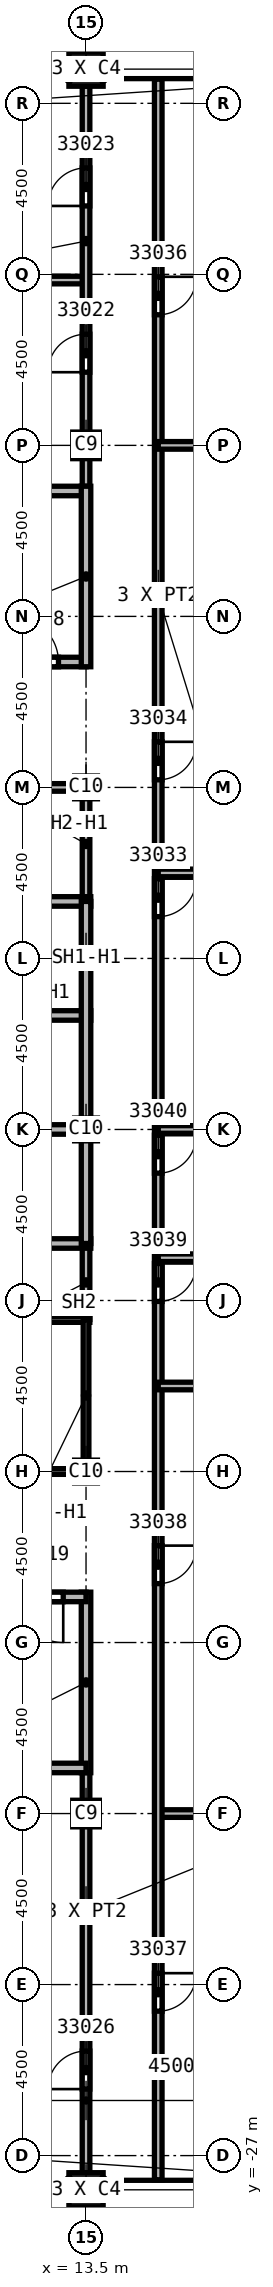
"""IFC4 building model, lengths in metres.
Left out: names, types, materials, properties, quantities, classifications, styles, units other than length and angle.
Written with IfcOpenShell. Run it as: python <this file> out.ifc"""

import sys

from ifc_helpers import new_model, si_unit, direction, frame, frame_2d, origin, origin_2d, place, context, subcontext, project, spatial, rectangle, extrude, element, fill, save


model = new_model("IFC4")
c1 = context("Model", 3, precision=1e-05, world=origin(), true_north=direction((0.0, 1.0)))
c2 = subcontext(c1, "Body", "Model", "MODEL_VIEW")
j1 = project(units=[si_unit("LENGTHUNIT", "METRE"), si_unit("PLANEANGLEUNIT", "RADIAN")], contexts=[c1])
p1 = place(None, origin())
s1 = spatial("IfcSite", under=j1, at=p1, CompositionType="ELEMENT")
p2 = place(p1, origin())
s2 = spatial("IfcBuilding", under=s1, at=p2, CompositionType="ELEMENT")
p3 = place(p2, frame((0.0, 0.0, 361.0)))
s3 = spatial("IfcBuildingStorey", under=s2, at=p3, CompositionType="ELEMENT", Elevation=361.0)
for number, where, z_axis, x_axis in (
    (1, (13.5, 18.0, 0.0), (0.0, 0.0, 1.0), (1.0, 0.0, 0.0)),
    (2, (13.5, -18.0, 0.0), (0.0, 0.0, 1.0), (1.0, 0.0, 0.0)),
):
    element("IfcColumn", number, at=place(p3, frame(where, z_axis=z_axis, x_axis=x_axis)), inside=s3, PredefinedType="COLUMN", context=c2, shape_type="SweptSolid", body=[
        extrude(rectangle(XDim=0.7, YDim=0.7, at=origin_2d()), origin(), (0.0, 0.0, 1.0), 4.6),
    ])
for number, where, z_axis, x_axis in (
    (3, (13.5, 0.0, 0.0), (0.0, 0.0, 1.0), (1.0, 0.0, 0.0)),
    (4, (13.5, 9.0, 0.0), (0.0, 0.0, 1.0), (1.0, 0.0, 0.0)),
    (5, (13.5, -9.0, 0.0), (0.0, 0.0, 1.0), (1.0, 0.0, 0.0)),
):
    element("IfcColumn", number, at=place(p3, frame(where, z_axis=z_axis, x_axis=x_axis)), inside=s3, PredefinedType="COLUMN", context=c2, shape_type="SweptSolid", body=[
        extrude(rectangle(XDim=0.6, YDim=0.6, at=origin_2d()), origin(), (0.0, 0.0, 1.0), 4.6),
    ])
for number, where, z_axis, x_axis in (
    (6, (13.5, 27.9, 0.0), (0.0, 0.0, 1.0), (1.0, 0.0, 0.0)),
    (7, (13.5, -27.9, 0.0), (0.0, 0.0, 1.0), (1.0, 0.0, 0.0)),
):
    element("IfcColumn", number, at=place(p3, frame(where, z_axis=z_axis, x_axis=x_axis)), inside=s3, PredefinedType="COLUMN", context=c2, shape_type="SweptSolid", body=[
        extrude(rectangle(XDim=0.9, YDim=0.9, at=origin_2d()), origin(), (0.0, 0.0, 1.0), 4.6),
    ])
p4 = place(p3, frame((3.0, 22.35, 0.0), z_axis=(0.0, 0.0, 1.0), x_axis=(1.0, 0.0, 0.0)))
e8 = element("IfcWall", 8, at=p4, inside=s3, PredefinedType="PARTITIONING", context=c2, shape_type="SweptSolid", body=[
    extrude(rectangle(XDim=10.5, YDim=0.2, at=frame_2d((5.25, 0.0))), origin(), (0.0, 0.0, 1.0), 4.15),
])
p5 = place(p3, frame((13.5, -27.45, 0.0), z_axis=(0.0, 0.0, 1.0), x_axis=(0.0, 1.0, 0.0)))
e9 = element("IfcWall", 9, at=p5, inside=s3, PredefinedType="PARTITIONING", context=c2, shape_type="SweptSolid", body=[
    extrude(rectangle(XDim=10.775, YDim=0.2, at=frame_2d((5.387, 0.0))), origin(), (0.0, 0.0, 1.0), 4.15),
])
p6 = place(p5, frame((2.2, 0.0, 0.0)))
e10 = element("IfcOpeningElement", 10, at=p6, cuts=e9, PredefinedType="OPENING", context=c2, shape_type="SweptSolid", body=[
    extrude(rectangle(XDim=1.0, YDim=2.1, at=frame_2d((0.5, 1.05))), frame((0.0, 0.1, 0.0), z_axis=(0.0, -1.0, 0.0), x_axis=(1.0, 0.0, 0.0)), (0.0, 0.0, 1.0), 0.2),
])
p7 = place(p3, frame((13.5, 16.675, 0.0), z_axis=(0.0, 0.0, 1.0), x_axis=(0.0, 1.0, 0.0)))
e11 = element("IfcWall", 11, at=p7, inside=s3, PredefinedType="PARTITIONING", context=c2, shape_type="SweptSolid", body=[
    extrude(rectangle(XDim=10.775, YDim=0.2, at=frame_2d((5.387, 0.0))), origin(), (0.0, 0.0, 1.0), 4.15),
])
p8 = place(p7, frame((3.25, 0.0, 0.0)))
e12 = element("IfcOpeningElement", 12, at=p8, cuts=e11, PredefinedType="OPENING", context=c2, shape_type="SweptSolid", body=[
    extrude(rectangle(XDim=1.0, YDim=2.1, at=frame_2d((0.5, 1.05))), frame((0.0, 0.1, 0.0), z_axis=(0.0, -1.0, 0.0), x_axis=(1.0, 0.0, 0.0)), (0.0, 0.0, 1.0), 0.2),
])
p9 = place(p7, frame((7.625, 0.0, 0.0)))
e13 = element("IfcOpeningElement", 13, at=p9, cuts=e11, PredefinedType="OPENING", context=c2, shape_type="SweptSolid", body=[
    extrude(rectangle(XDim=1.0, YDim=2.1, at=frame_2d((0.5, 1.05))), frame((0.0, 0.1, 0.0), z_axis=(0.0, -1.0, 0.0), x_axis=(1.0, 0.0, 0.0)), (0.0, 0.0, 1.0), 0.2),
])
p10 = place(p3, frame((15.4, -18.0, 0.0), z_axis=(0.0, 0.0, 1.0), x_axis=(1.0, 0.0, 0.0)))
e14 = element("IfcWall", 14, at=p10, inside=s3, PredefinedType="PARTITIONING", context=c2, shape_type="SweptSolid", body=[
    extrude(rectangle(XDim=8.9, YDim=0.2, at=frame_2d((4.45, 0.0))), origin(), (0.0, 0.0, 1.0), 4.15),
])
p11 = place(p3, frame((15.4, 27.636, 0.0), z_axis=(0.0, 0.0, 1.0), x_axis=(0.0, -1.0, 0.0)))
e15 = element("IfcWall", 15, at=p11, inside=s3, PredefinedType="PARTITIONING", context=c2, shape_type="SweptSolid", body=[
    extrude(rectangle(XDim=55.272, YDim=0.2, at=frame_2d((27.636, 0.0))), origin(), (0.0, 0.0, 1.0), 4.15),
])
p12 = place(p11, frame((21.036, 0.0, 0.0)))
e16 = element("IfcOpeningElement", 16, at=p12, cuts=e15, PredefinedType="OPENING", context=c2, shape_type="SweptSolid", body=[
    extrude(rectangle(XDim=1.0, YDim=2.1, at=frame_2d((0.5, 1.05))), frame((0.0, 0.1, 0.0), z_axis=(0.0, -1.0, 0.0), x_axis=(1.0, 0.0, 0.0)), (0.0, 0.0, 1.0), 0.2),
])
p13 = place(p11, frame((17.436, 0.0, 0.0)))
e17 = element("IfcOpeningElement", 17, at=p13, cuts=e15, PredefinedType="OPENING", context=c2, shape_type="SweptSolid", body=[
    extrude(rectangle(XDim=1.0, YDim=2.1, at=frame_2d((0.5, 1.05))), frame((0.0, 0.1, 0.0), z_axis=(0.0, -1.0, 0.0), x_axis=(1.0, 0.0, 0.0)), (0.0, 0.0, 1.0), 0.2),
])
p14 = place(p11, frame((5.2, 0.0, 0.0)))
e18 = element("IfcOpeningElement", 18, at=p14, cuts=e15, PredefinedType="OPENING", context=c2, shape_type="SweptSolid", body=[
    extrude(rectangle(XDim=1.0, YDim=2.1, at=frame_2d((0.5, 1.05))), frame((0.0, 0.1, 0.0), z_axis=(0.0, -1.0, 0.0), x_axis=(1.0, 0.0, 0.0)), (0.0, 0.0, 1.0), 0.2),
])
p15 = place(p11, frame((49.836, 0.0, 0.0)))
e19 = element("IfcOpeningElement", 19, at=p15, cuts=e15, PredefinedType="OPENING", context=c2, shape_type="SweptSolid", body=[
    extrude(rectangle(XDim=1.0, YDim=2.1, at=frame_2d((0.5, 1.05))), frame((0.0, 0.1, 0.0), z_axis=(0.0, -1.0, 0.0), x_axis=(1.0, 0.0, 0.0)), (0.0, 0.0, 1.0), 0.2),
])
p16 = place(p11, frame((38.586, 0.0, 0.0)))
e20 = element("IfcOpeningElement", 20, at=p16, cuts=e15, PredefinedType="OPENING", context=c2, shape_type="SweptSolid", body=[
    extrude(rectangle(XDim=1.0, YDim=2.1, at=frame_2d((0.5, 1.05))), frame((0.0, 0.1, 0.0), z_axis=(0.0, -1.0, 0.0), x_axis=(1.0, 0.0, 0.0)), (0.0, 0.0, 1.0), 0.2),
])
p17 = place(p11, frame((31.161, 0.0, 0.0)))
e21 = element("IfcOpeningElement", 21, at=p17, cuts=e15, PredefinedType="OPENING", context=c2, shape_type="SweptSolid", body=[
    extrude(rectangle(XDim=1.0, YDim=2.1, at=frame_2d((0.5, 1.05))), frame((0.0, 0.1, 0.0), z_axis=(0.0, -1.0, 0.0), x_axis=(1.0, 0.0, 0.0)), (0.0, 0.0, 1.0), 0.2),
])
p18 = place(p11, frame((27.786, 0.0, 0.0)))
e22 = element("IfcOpeningElement", 22, at=p18, cuts=e15, PredefinedType="OPENING", context=c2, shape_type="SweptSolid", body=[
    extrude(rectangle(XDim=1.0, YDim=2.1, at=frame_2d((0.5, 1.05))), frame((0.0, 0.1, 0.0), z_axis=(0.0, -1.0, 0.0), x_axis=(1.0, 0.0, 0.0)), (0.0, 0.0, 1.0), 0.2),
])
for number, where, z_axis, x_axis in (
    (23, (15.4, -6.75, 0.0), (0.0, 0.0, 1.0), (1.0, 0.0, 0.0)),
    (24, (15.4, -3.375, 0.0), (0.0, 0.0, 1.0), (1.0, 0.0, 0.0)),
):
    element("IfcWall", number, at=place(p3, frame(where, z_axis=z_axis, x_axis=x_axis)), inside=s3, PredefinedType="PARTITIONING", context=c2, shape_type="SweptSolid", body=[
        extrude(rectangle(XDim=11.336, YDim=0.2, at=frame_2d((5.668, 0.0))), origin(), (0.0, 0.0, 1.0), 4.15),
    ])
p19 = place(p3, frame((15.4, 6.75, 0.0), z_axis=(0.0, 0.0, 1.0), x_axis=(1.0, 0.0, 0.0)))
e25 = element("IfcWall", 25, at=p19, inside=s3, PredefinedType="PARTITIONING", context=c2, shape_type="SweptSolid", body=[
    extrude(rectangle(XDim=4.6, YDim=0.2, at=frame_2d((2.3, 0.0))), origin(), (0.0, 0.0, 1.0), 4.15),
])
p20 = place(p3, frame((15.4, 18.0, 0.0), z_axis=(0.0, 0.0, 1.0), x_axis=(1.0, 0.0, 0.0)))
e26 = element("IfcWall", 26, at=p20, inside=s3, PredefinedType="PARTITIONING", context=c2, shape_type="SweptSolid", body=[
    extrude(rectangle(XDim=8.9, YDim=0.2, at=frame_2d((4.45, 0.0))), origin(), (0.0, 0.0, 1.0), 4.15),
])
p21 = place(p3, frame((26.55, 0.0, 0.0), z_axis=(0.0, 0.0, 1.0), x_axis=(-1.0, 0.0, 0.0)))
e27 = element("IfcWall", 27, at=p21, inside=s3, PredefinedType="PARTITIONING", context=c2, shape_type="SweptSolid", body=[
    extrude(rectangle(XDim=11.15, YDim=0.2, at=frame_2d((5.575, 0.0))), origin(), (0.0, 0.0, 1.0), 4.15),
])
p22 = place(p3, frame((10.5, 9.0, 0.0), z_axis=(0.0, 0.0, 1.0), x_axis=(1.0, 0.0, 0.0)))
e28 = element("IfcWall", 28, at=p22, inside=s3, PredefinedType="SOLIDWALL", context=c2, shape_type="SweptSolid", body=[
    extrude(rectangle(XDim=3.0, YDim=0.2, at=frame_2d((1.5, 0.0))), origin(), (0.0, 0.0, 1.0), 3.838),
])
p23 = place(p3, frame((13.5, -3.0, 0.0), z_axis=(0.0, 0.0, 1.0), x_axis=(0.0, -1.0, 0.0)))
e29 = element("IfcWall", 29, at=p23, inside=s3, PredefinedType="SOLIDWALL", context=c2, shape_type="SweptSolid", body=[
    extrude(rectangle(XDim=2.0, YDim=0.2, at=frame_2d((1.0, 0.0))), origin(), (0.0, 0.0, 1.0), 3.838),
])
p24 = place(p3, frame((13.5, 9.1, 0.0), z_axis=(0.0, 0.0, 1.0), x_axis=(0.0, -1.0, 0.0)))
e30 = element("IfcWall", 30, at=p24, inside=s3, PredefinedType="SOLIDWALL", context=c2, shape_type="SweptSolid", body=[
    extrude(rectangle(XDim=3.1, YDim=0.2, at=frame_2d((1.55, 0.0))), origin(), (0.0, 0.0, 1.0), 3.838),
])
p25 = place(p3, frame((7.5, -3.0, 0.0), z_axis=(0.0, 0.0, 1.0), x_axis=(1.0, 0.0, 0.0)))
e31 = element("IfcWall", 31, at=p25, inside=s3, PredefinedType="SOLIDWALL", context=c2, shape_type="SweptSolid", body=[
    extrude(rectangle(XDim=6.125, YDim=0.25, at=frame_2d((3.062, 0.0))), origin(), (0.0, 0.0, 1.0), 4.15),
])
p26 = place(p25, frame((0.25, 0.0, 0.0)))
e32 = element("IfcOpeningElement", 32, at=p26, cuts=e31, PredefinedType="OPENING", context=c2, shape_type="SweptSolid", body=[
    extrude(rectangle(XDim=1.1, YDim=2.1, at=frame_2d((0.55, 1.05))), frame((0.0, 0.125, 0.0), z_axis=(0.0, -1.0, 0.0), x_axis=(1.0, 0.0, 0.0)), (0.0, 0.0, 1.0), 0.25),
])
p27 = place(p3, frame((7.5, 3.0, 0.0), z_axis=(0.0, 0.0, 1.0), x_axis=(1.0, 0.0, 0.0)))
e33 = element("IfcWall", 33, at=p27, inside=s3, PredefinedType="SOLIDWALL", context=c2, shape_type="SweptSolid", body=[
    extrude(rectangle(XDim=6.125, YDim=0.25, at=frame_2d((3.062, 0.0))), origin(), (0.0, 0.0, 1.0), 4.15),
])
p28 = place(p27, frame((0.25, 0.0, 0.0)))
e34 = element("IfcOpeningElement", 34, at=p28, cuts=e33, PredefinedType="OPENING", context=c2, shape_type="SweptSolid", body=[
    extrude(rectangle(XDim=1.1, YDim=2.1, at=frame_2d((0.55, 1.05))), frame((0.0, 0.125, 0.0), z_axis=(0.0, -1.0, 0.0), x_axis=(1.0, 0.0, 0.0)), (0.0, 0.0, 1.0), 0.25),
])
for number, where, z_axis, x_axis in (
    (35, (10.5, 0.0, 0.0), (0.0, 0.0, 1.0), (1.0, 0.0, 0.0)),
    (36, (10.5, 6.0, 0.0), (0.0, 0.0, 1.0), (1.0, 0.0, 0.0)),
):
    element("IfcWall", number, at=place(p3, frame(where, z_axis=z_axis, x_axis=x_axis)), inside=s3, PredefinedType="SOLIDWALL", context=c2, shape_type="SweptSolid", body=[
        extrude(rectangle(XDim=3.125, YDim=0.25, at=frame_2d((1.562, 0.0))), origin(), (0.0, 0.0, 1.0), 4.15),
    ])
p29 = place(p3, frame((13.5, 6.0, 0.0), z_axis=(0.0, 0.0, 1.0), x_axis=(0.0, -1.0, 0.0)))
e37 = element("IfcWall", 37, at=p29, inside=s3, PredefinedType="SOLIDWALL", context=c2, shape_type="SweptSolid", body=[
    extrude(rectangle(XDim=9.0, YDim=0.25, at=frame_2d((4.5, 0.0))), origin(), (0.0, 0.0, 1.0), 3.838),
])
p30 = place(p3, frame((4.375, 12.3, 0.0), z_axis=(0.0, 0.0, 1.0), x_axis=(1.0, 0.0, 0.0)))
e38 = element("IfcWall", 38, at=p30, inside=s3, PredefinedType="SOLIDWALL", context=c2, shape_type="SweptSolid", body=[
    extrude(rectangle(XDim=9.125, YDim=0.25, at=frame_2d((4.562, 0.0))), origin(), (0.0, 0.0, 1.0), 4.15),
])
p31 = place(p30, frame((7.2, 0.0, 0.0)))
e39 = element("IfcOpeningElement", 39, at=p31, cuts=e38, PredefinedType="OPENING", context=c2, shape_type="SweptSolid", body=[
    extrude(rectangle(XDim=1.2, YDim=2.1, at=frame_2d((0.6, 1.05))), frame((0.0, 0.125, 0.0), z_axis=(0.0, -1.0, 0.0), x_axis=(1.0, 0.0, 0.0)), (0.0, 0.0, 1.0), 0.25),
])
p32 = place(p3, frame((4.4, 16.8, 0.0), z_axis=(0.0, 0.0, 1.0), x_axis=(1.0, 0.0, 0.0)))
e40 = element("IfcWall", 40, at=p32, inside=s3, PredefinedType="SOLIDWALL", context=c2, shape_type="SweptSolid", body=[
    extrude(rectangle(XDim=9.1, YDim=0.25, at=frame_2d((4.55, 0.0))), origin(), (0.0, 0.0, 1.0), 4.15),
])
p33 = place(p3, frame((13.5, -16.925, 0.0), z_axis=(0.0, 0.0, 1.0), x_axis=(0.0, 1.0, 0.0)))
e41 = element("IfcWall", 41, at=p33, inside=s3, PredefinedType="SOLIDWALL", context=c2, shape_type="SweptSolid", body=[
    extrude(rectangle(XDim=4.75, YDim=0.25, at=frame_2d((2.375, 0.0))), origin(), (0.0, 0.0, 1.0), 4.15),
])
p34 = place(p3, frame((13.5, -16.8, 0.0), z_axis=(0.0, 0.0, 1.0), x_axis=(-1.0, 0.0, 0.0)))
e42 = element("IfcWall", 42, at=p34, inside=s3, PredefinedType="SOLIDWALL", context=c2, shape_type="SweptSolid", body=[
    extrude(rectangle(XDim=9.1, YDim=0.25, at=frame_2d((4.55, 0.0))), origin(), (0.0, 0.0, 1.0), 4.15),
])
p35 = place(p3, frame((13.5, -12.3, 0.0), z_axis=(0.0, 0.0, 1.0), x_axis=(-1.0, 0.0, 0.0)))
e43 = element("IfcWall", 43, at=p35, inside=s3, PredefinedType="SOLIDWALL", context=c2, shape_type="SweptSolid", body=[
    extrude(rectangle(XDim=9.125, YDim=0.25, at=frame_2d((4.562, 0.0))), origin(), (0.0, 0.0, 1.0), 4.15),
])
p36 = place(p35, frame((0.6, 0.0, 0.0)))
e44 = element("IfcOpeningElement", 44, at=p36, cuts=e43, PredefinedType="OPENING", context=c2, shape_type="SweptSolid", body=[
    extrude(rectangle(XDim=1.2, YDim=2.1, at=frame_2d((0.6, 1.05))), frame((0.0, 0.125, 0.0), z_axis=(0.0, -1.0, 0.0), x_axis=(1.0, 0.0, 0.0)), (0.0, 0.0, 1.0), 0.25),
])
p37 = place(p3, frame((13.5, 12.175, 0.0), z_axis=(0.0, 0.0, 1.0), x_axis=(0.0, 1.0, 0.0)))
e45 = element("IfcWall", 45, at=p37, inside=s3, PredefinedType="SOLIDWALL", context=c2, shape_type="SweptSolid", body=[
    extrude(rectangle(XDim=4.75, YDim=0.25, at=frame_2d((2.375, 0.0))), origin(), (0.0, 0.0, 1.0), 4.15),
])
p38 = place(p3, frame((10.5, -5.0, 0.0), z_axis=(0.0, 0.0, 1.0), x_axis=(1.0, 0.0, 0.0)))
e46 = element("IfcWall", 46, at=p38, inside=s3, PredefinedType="PARTITIONING", context=c2, shape_type="SweptSolid", body=[
    extrude(rectangle(XDim=3.1, YDim=0.15, at=frame_2d((1.55, 0.0))), origin(), (0.0, 0.0, 1.0), 4.15),
])
p39 = place(p3, frame((13.5, -9.0, 0.0), z_axis=(0.0, 0.0, 1.0), x_axis=(-1.0, 0.0, 0.0)))
e47 = element("IfcWall", 47, at=p39, inside=s3, PredefinedType="PARTITIONING", context=c2, shape_type="SweptSolid", body=[
    extrude(rectangle(XDim=3.0, YDim=0.15, at=frame_2d((1.5, 0.0))), origin(), (0.0, 0.0, 1.0), 3.838),
])
p40 = place(p3, frame((13.5, -5.0, 0.0), z_axis=(0.0, 0.0, 1.0), x_axis=(0.0, -1.0, 0.0)))
e48 = element("IfcWall", 48, at=p40, inside=s3, PredefinedType="PARTITIONING", context=c2, shape_type="SweptSolid", body=[
    extrude(rectangle(XDim=4.075, YDim=0.15, at=frame_2d((2.038, 0.0))), origin(), (0.0, 0.0, 1.0), 3.838),
])
p41 = place(p31, origin())
e49 = element("IfcDoor", 49, at=p41, inside=s3, OperationType="SINGLE_SWING_LEFT", PredefinedType="DOOR", context=c2, shape_type="SweptSolid", body=[
    extrude(rectangle(XDim=1.2, YDim=2.1, at=frame_2d((0.6, 1.05))), frame((0.0, 0.025, 0.0), z_axis=(0.0, -1.0, 0.0), x_axis=(1.0, 0.0, 0.0)), (0.0, 0.0, 1.0), 0.05),
])
fill(e39, e49)
p42 = place(p36, origin())
e50 = element("IfcDoor", 50, at=p42, inside=s3, OperationType="SINGLE_SWING_RIGHT", PredefinedType="DOOR", context=c2, shape_type="SweptSolid", body=[
    extrude(rectangle(XDim=1.2, YDim=2.1, at=frame_2d((0.6, 1.05))), frame((0.0, 0.025, 0.0), z_axis=(0.0, -1.0, 0.0), x_axis=(1.0, 0.0, 0.0)), (0.0, 0.0, 1.0), 0.05),
])
fill(e44, e50)
p43 = place(p8, origin())
e51 = element("IfcDoor", 51, at=p43, inside=s3, OperationType="SINGLE_SWING_LEFT", PredefinedType="DOOR", context=c2, shape_type="SweptSolid", body=[
    extrude(rectangle(XDim=1.0, YDim=2.1, at=frame_2d((0.5, 1.05))), frame((0.0, 0.025, 0.0), z_axis=(0.0, -1.0, 0.0), x_axis=(1.0, 0.0, 0.0)), (0.0, 0.0, 1.0), 0.05),
])
fill(e12, e51)
p44 = place(p9, origin())
e52 = element("IfcDoor", 52, at=p44, inside=s3, OperationType="SINGLE_SWING_RIGHT", PredefinedType="DOOR", context=c2, shape_type="SweptSolid", body=[
    extrude(rectangle(XDim=1.0, YDim=2.1, at=frame_2d((0.5, 1.05))), frame((0.0, 0.025, 0.0), z_axis=(0.0, -1.0, 0.0), x_axis=(1.0, 0.0, 0.0)), (0.0, 0.0, 1.0), 0.05),
])
fill(e13, e52)
p45 = place(p6, origin())
e53 = element("IfcDoor", 53, at=p45, inside=s3, OperationType="SINGLE_SWING_LEFT", PredefinedType="DOOR", context=c2, shape_type="SweptSolid", body=[
    extrude(rectangle(XDim=1.0, YDim=2.1, at=frame_2d((0.5, 1.05))), frame((0.0, 0.025, 0.0), z_axis=(0.0, -1.0, 0.0), x_axis=(1.0, 0.0, 0.0)), (0.0, 0.0, 1.0), 0.05),
])
fill(e10, e53)
p46 = place(p12, origin())
e54 = element("IfcDoor", 54, at=p46, inside=s3, OperationType="SINGLE_SWING_RIGHT", PredefinedType="DOOR", context=c2, shape_type="SweptSolid", body=[
    extrude(rectangle(XDim=1.0, YDim=2.1, at=frame_2d((0.5, 1.05))), frame((0.0, 0.025, 0.0), z_axis=(0.0, -1.0, 0.0), x_axis=(1.0, 0.0, 0.0)), (0.0, 0.0, 1.0), 0.05),
])
fill(e16, e54)
p47 = place(p13, origin())
e55 = element("IfcDoor", 55, at=p47, inside=s3, OperationType="SINGLE_SWING_LEFT", PredefinedType="DOOR", context=c2, shape_type="SweptSolid", body=[
    extrude(rectangle(XDim=1.0, YDim=2.1, at=frame_2d((0.5, 1.05))), frame((0.0, 0.025, 0.0), z_axis=(0.0, -1.0, 0.0), x_axis=(1.0, 0.0, 0.0)), (0.0, 0.0, 1.0), 0.05),
])
fill(e17, e55)
p48 = place(p14, origin())
e56 = element("IfcDoor", 56, at=p48, inside=s3, OperationType="SINGLE_SWING_LEFT", PredefinedType="DOOR", context=c2, shape_type="SweptSolid", body=[
    extrude(rectangle(XDim=1.0, YDim=2.1, at=frame_2d((0.5, 1.05))), frame((0.0, 0.025, 0.0), z_axis=(0.0, -1.0, 0.0), x_axis=(1.0, 0.0, 0.0)), (0.0, 0.0, 1.0), 0.05),
])
fill(e18, e56)
p49 = place(p15, origin())
e57 = element("IfcDoor", 57, at=p49, inside=s3, OperationType="SINGLE_SWING_RIGHT", PredefinedType="DOOR", context=c2, shape_type="SweptSolid", body=[
    extrude(rectangle(XDim=1.0, YDim=2.1, at=frame_2d((0.5, 1.05))), frame((0.0, 0.025, 0.0), z_axis=(0.0, -1.0, 0.0), x_axis=(1.0, 0.0, 0.0)), (0.0, 0.0, 1.0), 0.05),
])
fill(e19, e57)
p50 = place(p16, origin())
e58 = element("IfcDoor", 58, at=p50, inside=s3, OperationType="SINGLE_SWING_LEFT", PredefinedType="DOOR", context=c2, shape_type="SweptSolid", body=[
    extrude(rectangle(XDim=1.0, YDim=2.1, at=frame_2d((0.5, 1.05))), frame((0.0, 0.025, 0.0), z_axis=(0.0, -1.0, 0.0), x_axis=(1.0, 0.0, 0.0)), (0.0, 0.0, 1.0), 0.05),
])
fill(e20, e58)
p51 = place(p17, origin())
e59 = element("IfcDoor", 59, at=p51, inside=s3, OperationType="SINGLE_SWING_RIGHT", PredefinedType="DOOR", context=c2, shape_type="SweptSolid", body=[
    extrude(rectangle(XDim=1.0, YDim=2.1, at=frame_2d((0.5, 1.05))), frame((0.0, 0.025, 0.0), z_axis=(0.0, -1.0, 0.0), x_axis=(1.0, 0.0, 0.0)), (0.0, 0.0, 1.0), 0.05),
])
fill(e21, e59)
p52 = place(p18, origin())
e60 = element("IfcDoor", 60, at=p52, inside=s3, OperationType="SINGLE_SWING_LEFT", PredefinedType="DOOR", context=c2, shape_type="SweptSolid", body=[
    extrude(rectangle(XDim=1.0, YDim=2.1, at=frame_2d((0.5, 1.05))), frame((0.0, 0.025, 0.0), z_axis=(0.0, -1.0, 0.0), x_axis=(1.0, 0.0, 0.0)), (0.0, 0.0, 1.0), 0.05),
])
fill(e22, e60)
save(model, sys.argv[1])
